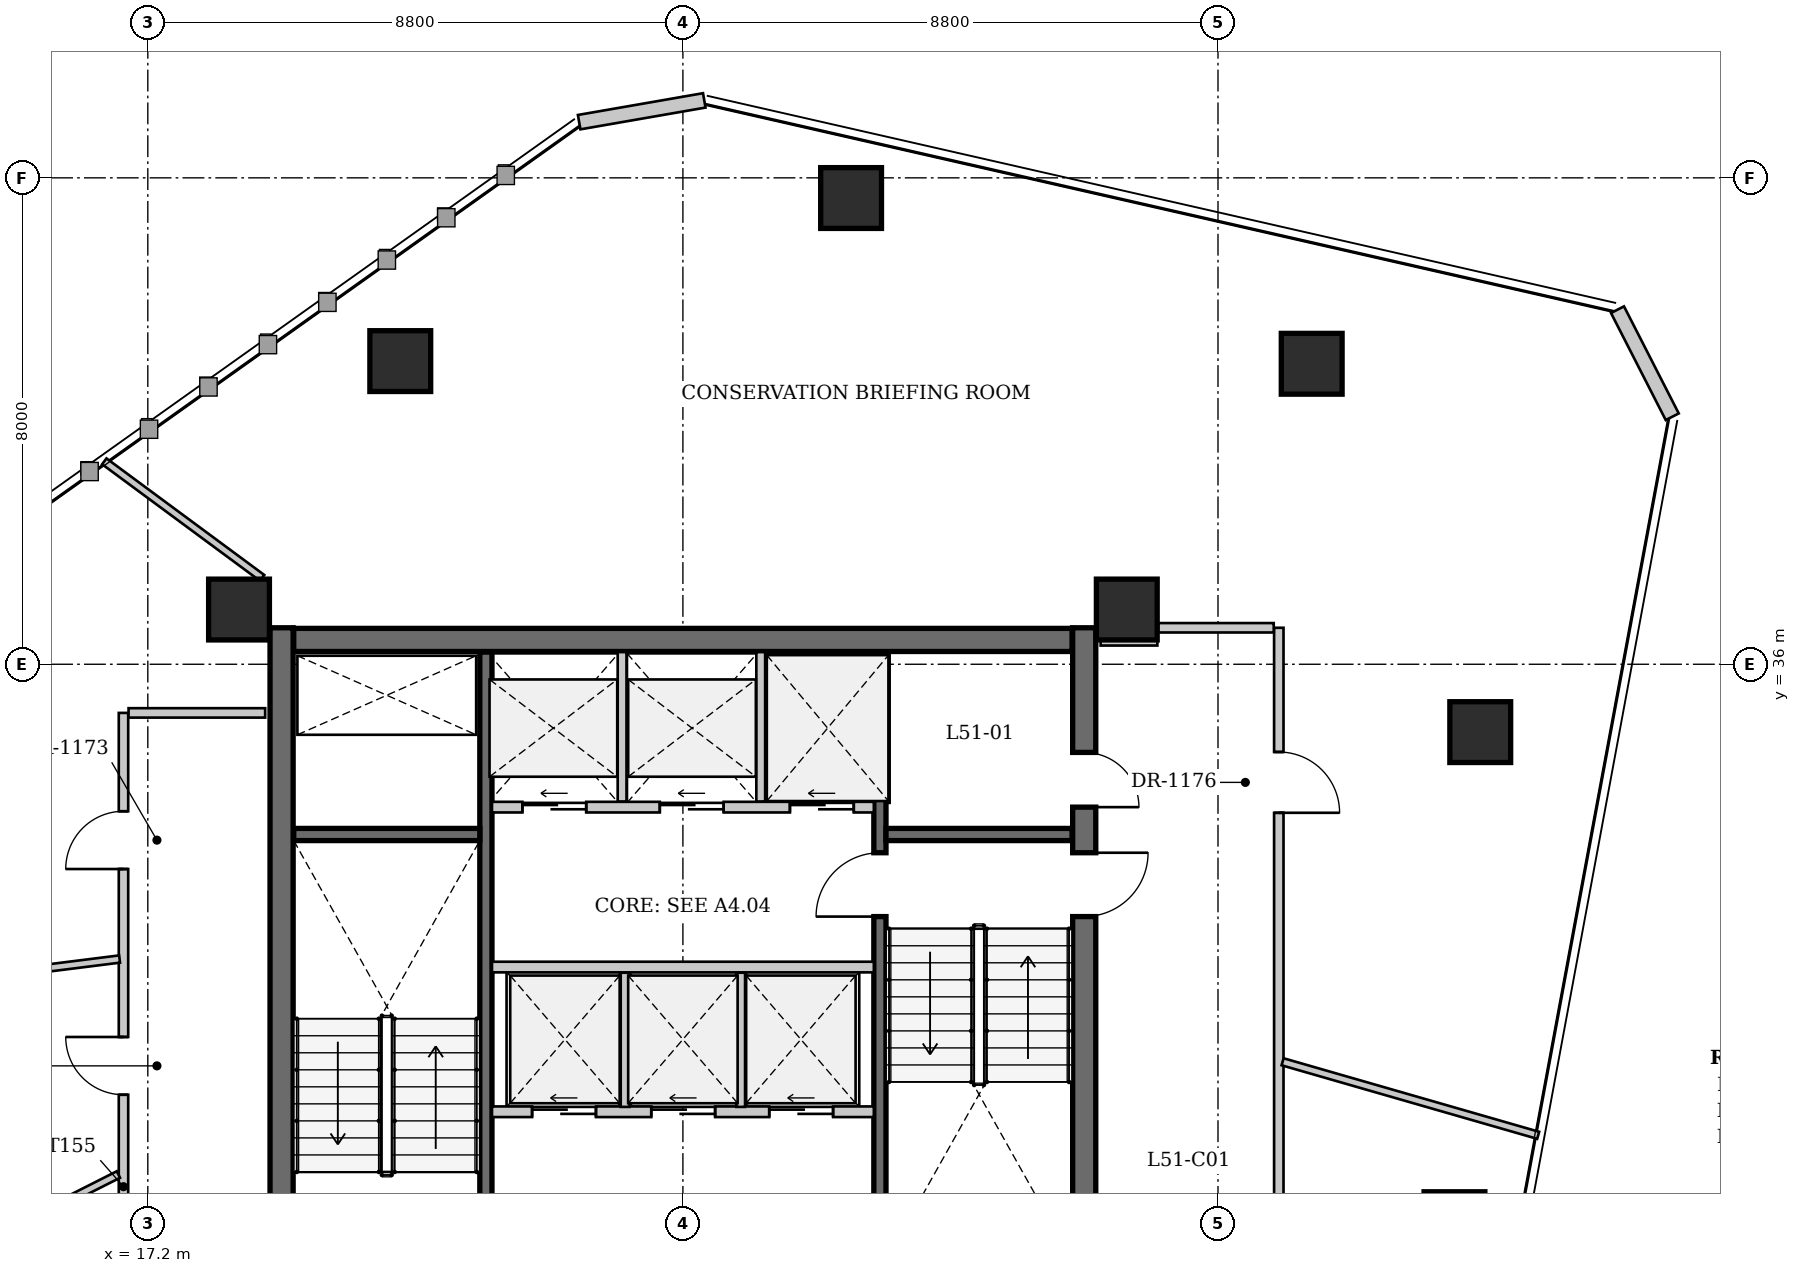
"""IFC4 building model, lengths in metres.
Left out: names, types, materials, properties, quantities, classifications, styles, units other than length and angle.
Written with IfcOpenShell. Run it as: python <this file> out.ifc"""

import sys

from ifc_helpers import new_model, si_unit, direction, frame, frame_2d, origin, origin_2d, place, context, subcontext, project, spatial, rectangle, extrude, source, transform, mapped, element, fill, save


model = new_model("IFC4")
c1 = context("Model", 3, precision=1e-05, world=origin(), true_north=direction((0.0, 1.0)))
c2 = subcontext(c1, "Body", "Model", "MODEL_VIEW")
j1 = project(units=[si_unit("LENGTHUNIT", "METRE"), si_unit("PLANEANGLEUNIT", "RADIAN")], contexts=[c1])
p1 = place(None, origin())
s1 = spatial("IfcSite", under=j1, at=p1, CompositionType="ELEMENT")
p2 = place(p1, origin())
s2 = spatial("IfcBuilding", under=s1, at=p2, CompositionType="ELEMENT")
p3 = place(p2, frame((0.0, 0.0, 195.0)))
s3 = spatial("IfcBuildingStorey", under=s2, at=p3, CompositionType="ELEMENT", Elevation=195.0)
for number, where, z_axis, x_axis in (
    (1, (28.766, 43.668, 0.0), (0.0, 0.0, 1.0), (1.0, 0.0, 0.0)),
    (2, (36.341, 40.942, 0.0), (0.0, 0.0, 1.0), (1.0, 0.0, 0.0)),
    (3, (39.113, 34.884, 0.0), (0.0, 0.0, 1.0), (1.0, 0.0, 0.0)),
    (4, (38.689, 26.824, 0.0), (0.0, 0.0, 1.0), (1.0, 0.0, 0.0)),
    (5, (21.352, 40.986, 0.0), (0.0, 0.0, 1.0), (1.0, 0.0, 0.0)),
    (6, (33.3, 36.9, 0.0), (0.0, 0.0, 1.0), (1.0, 0.0, 0.0)),
    (7, (18.7, 36.9, 0.0), (0.0, 0.0, 1.0), (1.0, 0.0, 0.0)),
):
    element("IfcColumn", number, at=place(p3, frame(where, z_axis=z_axis, x_axis=x_axis)), inside=s3, PredefinedType="COLUMN", context=c2, shape_type="SweptSolid", body=[
        extrude(rectangle(XDim=1.0, YDim=1.0, at=origin_2d()), origin(), (0.0, 0.0, 1.0), 3.23),
    ])
p4 = place(p3, frame((24.294, 44.916, 0.0), z_axis=(0.0, 0.0, 1.0), x_axis=(0.985186864135, 0.171484234657, 0.0)))
e8 = element("IfcWall", 8, at=p4, inside=s3, PredefinedType="SOLIDWALL", context=c2, shape_type="SweptSolid", body=[
    extrude(rectangle(XDim=2.089, YDim=0.24, at=frame_2d((1.044, 0.0))), origin(), (0.0, 0.0, 1.0), 3.23),
])
p5 = place(p3, frame((41.37, 41.832, 0.0), z_axis=(0.0, 0.0, 1.0), x_axis=(0.455243725282, -0.890366862923, 0.0)))
e9 = element("IfcWall", 9, at=p5, inside=s3, PredefinedType="SOLIDWALL", context=c2, shape_type="SweptSolid", body=[
    extrude(rectangle(XDim=1.978, YDim=0.24, at=frame_2d((0.989, 0.0))), origin(), (0.0, 0.0, 1.0), 3.23),
])
p6 = place(p3, frame((19.4, 25.8, 0.0), z_axis=(0.0, 0.0, 1.0), x_axis=(0.0, 1.0, 0.0)))
e10 = element("IfcWall", 10, at=p6, inside=s3, PredefinedType="SHEAR", context=c2, shape_type="SweptSolid", body=[
    extrude(rectangle(XDim=10.8, YDim=0.38, at=frame_2d((5.4, 0.0))), origin(), (0.0, 0.0, 1.0), 3.5),
])
p7 = place(p3, frame((32.6, 36.6, 0.0), z_axis=(0.0, 0.0, 1.0), x_axis=(0.0, -1.0, 0.0)))
e11 = element("IfcWall", 11, at=p7, inside=s3, PredefinedType="SHEAR", context=c2, shape_type="SweptSolid", body=[
    extrude(rectangle(XDim=10.8, YDim=0.38, at=frame_2d((5.4, 0.0))), origin(), (0.0, 0.0, 1.0), 3.5),
])
p8 = place(p7, frame((3.7, 0.0, 0.0)))
e12 = element("IfcOpeningElement", 12, at=p8, cuts=e11, PredefinedType="OPENING", context=c2, shape_type="SweptSolid", body=[
    extrude(rectangle(XDim=1.05, YDim=2.15, at=frame_2d((0.525, 1.075))), frame((0.0, 0.2, 0.0), z_axis=(0.0, -1.0, 0.0), x_axis=(1.0, 0.0, 0.0)), (0.0, 0.0, 1.0), 0.4),
])
p9 = place(p7, frame((2.05, 0.0, 0.0)))
e13 = element("IfcOpeningElement", 13, at=p9, cuts=e11, PredefinedType="OPENING", context=c2, shape_type="SweptSolid", body=[
    extrude(rectangle(XDim=0.9, YDim=2.1, at=frame_2d((0.45, 1.05))), frame((0.0, 0.2, 0.0), z_axis=(0.0, -1.0, 0.0), x_axis=(1.0, 0.0, 0.0)), (0.0, 0.0, 1.0), 0.4),
])
p10 = place(p3, frame((19.6, 36.4, 0.0), z_axis=(0.0, 0.0, 1.0), x_axis=(1.0, 0.0, 0.0)))
e14 = element("IfcWall", 14, at=p10, inside=s3, PredefinedType="SHEAR", context=c2, shape_type="SweptSolid", body=[
    extrude(rectangle(XDim=12.8, YDim=0.38, at=frame_2d((6.4, 0.0))), origin(), (0.0, 0.0, 1.0), 3.5),
])
p11 = place(p3, frame((22.76, 26.2, 0.0), z_axis=(0.0, 0.0, 1.0), x_axis=(0.0, 1.0, 0.0)))
e15 = element("IfcWall", 15, at=p11, inside=s3, PredefinedType="SHEAR", context=c2, shape_type="SweptSolid", body=[
    extrude(rectangle(XDim=10.0, YDim=0.2, at=frame_2d((5.0, 0.0))), origin(), (0.0, 0.0, 1.0), 3.5),
])
p12 = place(p3, frame((29.24, 26.2, 0.0), z_axis=(0.0, 0.0, 1.0), x_axis=(0.0, 1.0, 0.0)))
e16 = element("IfcWall", 16, at=p12, inside=s3, PredefinedType="SHEAR", context=c2, shape_type="SweptSolid", body=[
    extrude(rectangle(XDim=10.0, YDim=0.2, at=frame_2d((5.0, 0.0))), origin(), (0.0, 0.0, 1.0), 3.5),
])
p13 = place(p12, frame((5.65, 0.0, 0.0)))
e17 = element("IfcOpeningElement", 17, at=p13, cuts=e16, PredefinedType="OPENING", context=c2, shape_type="SweptSolid", body=[
    extrude(rectangle(XDim=1.05, YDim=2.15, at=frame_2d((0.525, 1.075))), frame((0.0, 0.11, 0.0), z_axis=(0.0, -1.0, 0.0), x_axis=(1.0, 0.0, 0.0)), (0.0, 0.0, 1.0), 0.22),
])
for number, where, z_axis, x_axis in (
    (18, (19.6, 33.2, 0.0), (0.0, 0.0, 1.0), (1.0, 0.0, 0.0)),
    (19, (29.34, 33.2, 0.0), (0.0, 0.0, 1.0), (1.0, 0.0, 0.0)),
):
    element("IfcWall", number, at=place(p3, frame(where, z_axis=z_axis, x_axis=x_axis)), inside=s3, PredefinedType="SHEAR", context=c2, shape_type="SweptSolid", body=[
        extrude(rectangle(XDim=3.06, YDim=0.2, at=frame_2d((1.53, 0.0))), origin(), (0.0, 0.0, 1.0), 3.5),
    ])
p14 = place(p3, frame((22.86, 33.65, 0.0), z_axis=(0.0, 0.0, 1.0), x_axis=(1.0, 0.0, 0.0)))
e20 = element("IfcWall", 20, at=p14, inside=s3, PredefinedType="SOLIDWALL", context=c2, shape_type="SweptSolid", body=[
    extrude(rectangle(XDim=6.28, YDim=0.175, at=frame_2d((3.14, 0.0))), origin(), (0.0, 0.0, 1.0), 3.23),
])
p15 = place(p14, frame((0.5, 0.0, 0.0)))
e21 = element("IfcOpeningElement", 21, at=p15, cuts=e20, PredefinedType="OPENING", context=c2, shape_type="SweptSolid", body=[
    extrude(rectangle(XDim=1.05, YDim=2.15, at=frame_2d((0.525, 1.075))), frame((0.0, 0.098, 0.0), z_axis=(0.0, -1.0, 0.0), x_axis=(1.0, 0.0, 0.0)), (0.0, 0.0, 1.0), 0.195),
])
p16 = place(p14, frame((2.76, 0.0, 0.0)))
e22 = element("IfcOpeningElement", 22, at=p16, cuts=e20, PredefinedType="OPENING", context=c2, shape_type="SweptSolid", body=[
    extrude(rectangle(XDim=1.05, YDim=2.15, at=frame_2d((0.525, 1.075))), frame((0.0, 0.098, 0.0), z_axis=(0.0, -1.0, 0.0), x_axis=(1.0, 0.0, 0.0)), (0.0, 0.0, 1.0), 0.195),
])
p17 = place(p14, frame((4.9, 0.0, 0.0)))
e23 = element("IfcOpeningElement", 23, at=p17, cuts=e20, PredefinedType="OPENING", context=c2, shape_type="SweptSolid", body=[
    extrude(rectangle(XDim=1.05, YDim=2.15, at=frame_2d((0.525, 1.075))), frame((0.0, 0.098, 0.0), z_axis=(0.0, -1.0, 0.0), x_axis=(1.0, 0.0, 0.0)), (0.0, 0.0, 1.0), 0.195),
])
for number, where, z_axis, x_axis in (
    (24, (25.0, 33.743, 0.0), (0.0, 0.0, 1.0), (0.0, 1.0, 0.0)),
    (25, (27.28, 33.743, 0.0), (0.0, 0.0, 1.0), (0.0, 1.0, 0.0)),
):
    element("IfcWall", number, at=place(p3, frame(where, z_axis=z_axis, x_axis=x_axis)), inside=s3, PredefinedType="SOLIDWALL", context=c2, shape_type="SweptSolid", body=[
        extrude(rectangle(XDim=2.457, YDim=0.145, at=frame_2d((1.228, 0.0))), origin(), (0.0, 0.0, 1.0), 3.23),
    ])
p18 = place(p3, frame((22.86, 31.02, 0.0), z_axis=(0.0, 0.0, 1.0), x_axis=(1.0, 0.0, 0.0)))
e26 = element("IfcWall", 26, at=p18, inside=s3, PredefinedType="SOLIDWALL", context=c2, shape_type="SweptSolid", body=[
    extrude(rectangle(XDim=6.28, YDim=0.175, at=frame_2d((3.14, 0.0))), origin(), (0.0, 0.0, 1.0), 3.23),
])
p19 = place(p3, frame((22.86, 28.64, 0.0), z_axis=(0.0, 0.0, 1.0), x_axis=(1.0, 0.0, 0.0)))
e27 = element("IfcWall", 27, at=p19, inside=s3, PredefinedType="SOLIDWALL", context=c2, shape_type="SweptSolid", body=[
    extrude(rectangle(XDim=6.28, YDim=0.175, at=frame_2d((3.14, 0.0))), origin(), (0.0, 0.0, 1.0), 3.23),
])
p20 = place(p19, frame((0.66, 0.0, 0.0)))
e28 = element("IfcOpeningElement", 28, at=p20, cuts=e27, PredefinedType="OPENING", context=c2, shape_type="SweptSolid", body=[
    extrude(rectangle(XDim=1.05, YDim=2.15, at=frame_2d((0.525, 1.075))), frame((0.0, 0.098, 0.0), z_axis=(0.0, -1.0, 0.0), x_axis=(1.0, 0.0, 0.0)), (0.0, 0.0, 1.0), 0.195),
])
p21 = place(p19, frame((2.62, 0.0, 0.0)))
e29 = element("IfcOpeningElement", 29, at=p21, cuts=e27, PredefinedType="OPENING", context=c2, shape_type="SweptSolid", body=[
    extrude(rectangle(XDim=1.05, YDim=2.15, at=frame_2d((0.525, 1.075))), frame((0.0, 0.098, 0.0), z_axis=(0.0, -1.0, 0.0), x_axis=(1.0, 0.0, 0.0)), (0.0, 0.0, 1.0), 0.195),
])
p22 = place(p19, frame((4.56, 0.0, 0.0)))
e30 = element("IfcOpeningElement", 30, at=p22, cuts=e27, PredefinedType="OPENING", context=c2, shape_type="SweptSolid", body=[
    extrude(rectangle(XDim=1.05, YDim=2.15, at=frame_2d((0.525, 1.075))), frame((0.0, 0.098, 0.0), z_axis=(0.0, -1.0, 0.0), x_axis=(1.0, 0.0, 0.0)), (0.0, 0.0, 1.0), 0.195),
])
for number, where, z_axis, x_axis in (
    (31, (25.05, 28.72, 0.0), (0.0, 0.0, 1.0), (0.0, 1.0, 0.0)),
    (32, (26.95, 28.72, 0.0), (0.0, 0.0, 1.0), (0.0, 1.0, 0.0)),
):
    element("IfcWall", number, at=place(p3, frame(where, z_axis=z_axis, x_axis=x_axis)), inside=s3, PredefinedType="SOLIDWALL", context=c2, shape_type="SweptSolid", body=[
        extrude(rectangle(XDim=2.207, YDim=0.145, at=frame_2d((1.103, 0.0))), origin(), (0.0, 0.0, 1.0), 3.23),
    ])
p23 = place(p3, frame((16.8, 23.0, 0.0), z_axis=(0.0, 0.0, 1.0), x_axis=(0.0, 1.0, 0.0)))
e33 = element("IfcWall", 33, at=p23, inside=s3, PredefinedType="PARTITIONING", context=c2, shape_type="SweptSolid", body=[
    extrude(rectangle(XDim=12.2, YDim=0.155, at=frame_2d((6.1, 0.0))), origin(), (0.0, 0.0, 1.0), 3.23),
])
p24 = place(p23, frame((1.896, 0.0, 0.0)))
e34 = element("IfcOpeningElement", 34, at=p24, cuts=e33, PredefinedType="OPENING", context=c2, shape_type="SweptSolid", body=[
    extrude(rectangle(XDim=1.0, YDim=2.15, at=frame_2d((0.5, 1.075))), frame((0.0, 0.087, 0.0), z_axis=(0.0, -1.0, 0.0), x_axis=(1.0, 0.0, 0.0)), (0.0, 0.0, 1.0), 0.175),
])
p25 = place(p23, frame((9.632, 0.0, 0.0)))
e35 = element("IfcOpeningElement", 35, at=p25, cuts=e33, PredefinedType="OPENING", context=c2, shape_type="SweptSolid", body=[
    extrude(rectangle(XDim=0.95, YDim=2.15, at=frame_2d((0.475, 1.075))), frame((0.0, 0.087, 0.0), z_axis=(0.0, -1.0, 0.0), x_axis=(1.0, 0.0, 0.0)), (0.0, 0.0, 1.0), 0.175),
])
p26 = place(p23, frame((5.92, 0.0, 0.0)))
e36 = element("IfcOpeningElement", 36, at=p26, cuts=e33, PredefinedType="OPENING", context=c2, shape_type="SweptSolid", body=[
    extrude(rectangle(XDim=0.95, YDim=2.15, at=frame_2d((0.475, 1.075))), frame((0.0, 0.087, 0.0), z_axis=(0.0, -1.0, 0.0), x_axis=(1.0, 0.0, 0.0)), (0.0, 0.0, 1.0), 0.175),
])
p27 = place(p3, frame((35.8, 36.6, 0.0), z_axis=(0.0, 0.0, 1.0), x_axis=(0.0, -1.0, 0.0)))
e37 = element("IfcWall", 37, at=p27, inside=s3, PredefinedType="PARTITIONING", context=c2, shape_type="SweptSolid", body=[
    extrude(rectangle(XDim=13.6, YDim=0.155, at=frame_2d((6.8, 0.0))), origin(), (0.0, 0.0, 1.0), 3.23),
])
p28 = place(p27, frame((9.815, 0.0, 0.0)))
e38 = element("IfcOpeningElement", 38, at=p28, cuts=e37, PredefinedType="OPENING", context=c2, shape_type="SweptSolid", body=[
    extrude(rectangle(XDim=0.95, YDim=2.15, at=frame_2d((0.475, 1.075))), frame((0.0, 0.087, 0.0), z_axis=(0.0, -1.0, 0.0), x_axis=(1.0, 0.0, 0.0)), (0.0, 0.0, 1.0), 0.175),
])
p29 = place(p27, frame((2.043, 0.0, 0.0)))
e39 = element("IfcOpeningElement", 39, at=p29, cuts=e37, PredefinedType="OPENING", context=c2, shape_type="SweptSolid", body=[
    extrude(rectangle(XDim=1.0, YDim=2.15, at=frame_2d((0.5, 1.075))), frame((0.0, 0.087, 0.0), z_axis=(0.0, -1.0, 0.0), x_axis=(1.0, 0.0, 0.0)), (0.0, 0.0, 1.0), 0.175),
])
p30 = place(p3, frame((16.884, 35.2, 0.0), z_axis=(0.0, 0.0, 1.0), x_axis=(1.0, 0.0, 0.0)))
e40 = element("IfcWall", 40, at=p30, inside=s3, PredefinedType="PARTITIONING", context=c2, shape_type="SweptSolid", body=[
    extrude(rectangle(XDim=2.246, YDim=0.155, at=frame_2d((1.123, 0.0))), origin(), (0.0, 0.0, 1.0), 3.23),
])
p31 = place(p3, frame((32.87, 36.385, 0.0), z_axis=(0.0, 0.0, 1.0), x_axis=(0.999999965754, 0.000261711585, 0.0)))
e41 = element("IfcWall", 41, at=p31, inside=s3, PredefinedType="PARTITIONING", context=c2, shape_type="SweptSolid", body=[
    extrude(rectangle(XDim=0.933, YDim=0.155, at=frame_2d((0.466, 0.0))), origin(), (0.0, 0.0, 1.0), 3.23),
])
p32 = place(p3, frame((33.815, 36.6, 0.0), z_axis=(0.0, 0.0, 1.0), x_axis=(1.0, 0.0, 0.0)))
e42 = element("IfcWall", 42, at=p32, inside=s3, PredefinedType="PARTITIONING", context=c2, shape_type="SweptSolid", body=[
    extrude(rectangle(XDim=1.902, YDim=0.155, at=frame_2d((0.951, 0.0))), origin(), (0.0, 0.0, 1.0), 2.589),
])
p33 = place(p3, frame((9.972, 24.2, 0.0), z_axis=(0.0, 0.0, 1.0), x_axis=(0.892532461232, 0.450983154504, 0.0)))
e43 = element("IfcWall", 43, at=p33, inside=s3, PredefinedType="PARTITIONING", context=c2, shape_type="SweptSolid", body=[
    extrude(rectangle(XDim=7.557, YDim=0.12, at=frame_2d((3.778, 0.0))), origin(), (0.0, 0.0, 1.0), 3.23),
])
p34 = place(p3, frame((35.863, 29.462, 0.0), z_axis=(0.0, 0.0, 1.0), x_axis=(0.960999786339, -0.276549110748, 0.0)))
e44 = element("IfcWall", 44, at=p34, inside=s3, PredefinedType="PARTITIONING", context=c2, shape_type="SweptSolid", body=[
    extrude(rectangle(XDim=4.374, YDim=0.12, at=frame_2d((2.187, 0.0))), origin(), (0.0, 0.0, 1.0), 3.23),
])
p35 = place(p3, frame((19.08, 37.42, 0.0), z_axis=(0.0, 0.0, 1.0), x_axis=(-0.80430976954, 0.594210227633, 0.0)))
e45 = element("IfcWall", 45, at=p35, inside=s3, PredefinedType="PARTITIONING", context=c2, shape_type="SweptSolid", body=[
    extrude(rectangle(XDim=3.227, YDim=0.12, at=frame_2d((1.614, 0.0))), origin(), (0.0, 0.0, 1.0), 3.23),
])
p36 = place(p3, frame((16.736, 31.152, 0.0), z_axis=(0.0, 0.0, 1.0), x_axis=(-0.992197947241, -0.124672504948, 0.0)))
e46 = element("IfcWall", 46, at=p36, inside=s3, PredefinedType="PARTITIONING", context=c2, shape_type="SweptSolid", body=[
    extrude(rectangle(XDim=5.654, YDim=0.12, at=frame_2d((2.827, 0.0))), origin(), (0.0, 0.0, 1.0), 3.23),
])
m1 = source(origin(), c2, "Body", "SweptSolid", [
    extrude(rectangle(XDim=1.05, YDim=2.15, at=frame_2d((0.525, 1.075))), frame((0.0, 0.025, 0.0), z_axis=(0.0, -1.0, 0.0), x_axis=(1.0, 0.0, 0.0)), (0.0, 0.0, 1.0), 0.05),
])
p37 = place(p8, origin())
e47 = element("IfcDoor", 47, at=p37, inside=s3, OperationType="SINGLE_SWING_LEFT", PredefinedType="DOOR", context=c2, shape_type="MappedRepresentation", body=[
    mapped(m1, transform((0.0, 0.0, 0.0), x_axis=(1.0, 0.0, 0.0), y_axis=(0.0, 1.0, 0.0), z_axis=(0.0, 0.0, 1.0), scale=1.0)),
])
fill(e12, e47)
p38 = place(p13, origin())
e48 = element("IfcDoor", 48, at=p38, inside=s3, OperationType="SINGLE_SWING_LEFT", PredefinedType="DOOR", context=c2, shape_type="MappedRepresentation", body=[
    mapped(m1, transform((0.0, 0.0, 0.0), x_axis=(1.0, 0.0, 0.0), y_axis=(0.0, 1.0, 0.0), z_axis=(0.0, 0.0, 1.0), scale=1.0)),
])
fill(e17, e48)
m2 = source(origin(), c2, "Body", "SweptSolid", [
    extrude(rectangle(XDim=1.05, YDim=2.15, at=frame_2d((0.525, 1.075))), frame((0.0, 0.025, 0.0), z_axis=(0.0, -1.0, 0.0), x_axis=(1.0, 0.0, 0.0)), (0.0, 0.0, 1.0), 0.05),
])
p39 = place(p15, origin())
e49 = element("IfcDoor", 49, at=p39, inside=s3, OperationType="SLIDING_TO_LEFT", PredefinedType="DOOR", context=c2, shape_type="MappedRepresentation", body=[
    mapped(m2, transform((0.0, 0.0, 0.0), x_axis=(1.0, 0.0, 0.0), y_axis=(0.0, 1.0, 0.0), z_axis=(0.0, 0.0, 1.0), scale=1.0)),
])
fill(e21, e49)
p40 = place(p16, origin())
e50 = element("IfcDoor", 50, at=p40, inside=s3, OperationType="SLIDING_TO_LEFT", PredefinedType="DOOR", context=c2, shape_type="MappedRepresentation", body=[
    mapped(m2, transform((0.0, 0.0, 0.0), x_axis=(1.0, 0.0, 0.0), y_axis=(0.0, 1.0, 0.0), z_axis=(0.0, 0.0, 1.0), scale=1.0)),
])
fill(e22, e50)
p41 = place(p17, origin())
e51 = element("IfcDoor", 51, at=p41, inside=s3, OperationType="SLIDING_TO_LEFT", PredefinedType="DOOR", context=c2, shape_type="MappedRepresentation", body=[
    mapped(m2, transform((0.0, 0.0, 0.0), x_axis=(1.0, 0.0, 0.0), y_axis=(0.0, 1.0, 0.0), z_axis=(0.0, 0.0, 1.0), scale=1.0)),
])
fill(e23, e51)
p42 = place(p20, origin())
e52 = element("IfcDoor", 52, at=p42, inside=s3, OperationType="SLIDING_TO_LEFT", PredefinedType="DOOR", context=c2, shape_type="MappedRepresentation", body=[
    mapped(m2, transform((0.0, 0.0, 0.0), x_axis=(1.0, 0.0, 0.0), y_axis=(0.0, 1.0, 0.0), z_axis=(0.0, 0.0, 1.0), scale=1.0)),
])
fill(e28, e52)
p43 = place(p21, origin())
e53 = element("IfcDoor", 53, at=p43, inside=s3, OperationType="SLIDING_TO_LEFT", PredefinedType="DOOR", context=c2, shape_type="MappedRepresentation", body=[
    mapped(m2, transform((0.0, 0.0, 0.0), x_axis=(1.0, 0.0, 0.0), y_axis=(0.0, 1.0, 0.0), z_axis=(0.0, 0.0, 1.0), scale=1.0)),
])
fill(e29, e53)
p44 = place(p22, origin())
e54 = element("IfcDoor", 54, at=p44, inside=s3, OperationType="SLIDING_TO_LEFT", PredefinedType="DOOR", context=c2, shape_type="MappedRepresentation", body=[
    mapped(m2, transform((0.0, 0.0, 0.0), x_axis=(1.0, 0.0, 0.0), y_axis=(0.0, 1.0, 0.0), z_axis=(0.0, 0.0, 1.0), scale=1.0)),
])
fill(e30, e54)
m3 = source(origin(), c2, "Body", "SweptSolid", [
    extrude(rectangle(XDim=0.9, YDim=2.1, at=frame_2d((0.45, 1.05))), frame((0.0, 0.025, 0.0), z_axis=(0.0, -1.0, 0.0), x_axis=(1.0, 0.0, 0.0)), (0.0, 0.0, 1.0), 0.05),
])
p45 = place(p9, origin())
e55 = element("IfcDoor", 55, at=p45, inside=s3, OperationType="SINGLE_SWING_RIGHT", PredefinedType="DOOR", context=c2, shape_type="MappedRepresentation", body=[
    mapped(m3, transform((0.0, 0.0, 0.0), x_axis=(1.0, 0.0, 0.0), y_axis=(0.0, 1.0, 0.0), z_axis=(0.0, 0.0, 1.0), scale=1.0)),
])
fill(e13, e55)
m4 = source(origin(), c2, "Body", "SweptSolid", [
    extrude(rectangle(XDim=0.95, YDim=2.15, at=frame_2d((0.475, 1.075))), frame((0.0, 0.025, 0.0), z_axis=(0.0, -1.0, 0.0), x_axis=(1.0, 0.0, 0.0)), (0.0, 0.0, 1.0), 0.05),
])
p46 = place(p25, origin())
e56 = element("IfcDoor", 56, at=p46, inside=s3, OperationType="SINGLE_SWING_LEFT", PredefinedType="DOOR", context=c2, shape_type="MappedRepresentation", body=[
    mapped(m4, transform((0.0, 0.0, 0.0), x_axis=(1.0, 0.0, 0.0), y_axis=(0.0, 1.0, 0.0), z_axis=(0.0, 0.0, 1.0), scale=1.0)),
])
fill(e35, e56)
p47 = place(p26, origin())
e57 = element("IfcDoor", 57, at=p47, inside=s3, OperationType="SINGLE_SWING_RIGHT", PredefinedType="DOOR", context=c2, shape_type="MappedRepresentation", body=[
    mapped(m4, transform((0.0, 0.0, 0.0), x_axis=(1.0, 0.0, 0.0), y_axis=(0.0, 1.0, 0.0), z_axis=(0.0, 0.0, 1.0), scale=1.0)),
])
fill(e36, e57)
m5 = source(origin(), c2, "Body", "SweptSolid", [
    extrude(rectangle(XDim=1.0, YDim=2.15, at=frame_2d((0.5, 1.075))), frame((0.0, 0.025, 0.0), z_axis=(0.0, -1.0, 0.0), x_axis=(1.0, 0.0, 0.0)), (0.0, 0.0, 1.0), 0.05),
])
p48 = place(p29, origin())
e58 = element("IfcDoor", 58, at=p48, inside=s3, OperationType="SINGLE_SWING_RIGHT", PredefinedType="DOOR", context=c2, shape_type="MappedRepresentation", body=[
    mapped(m5, transform((0.0, 0.0, 0.0), x_axis=(1.0, 0.0, 0.0), y_axis=(0.0, 1.0, 0.0), z_axis=(0.0, 0.0, 1.0), scale=1.0)),
])
fill(e39, e58)
save(model, sys.argv[1])
